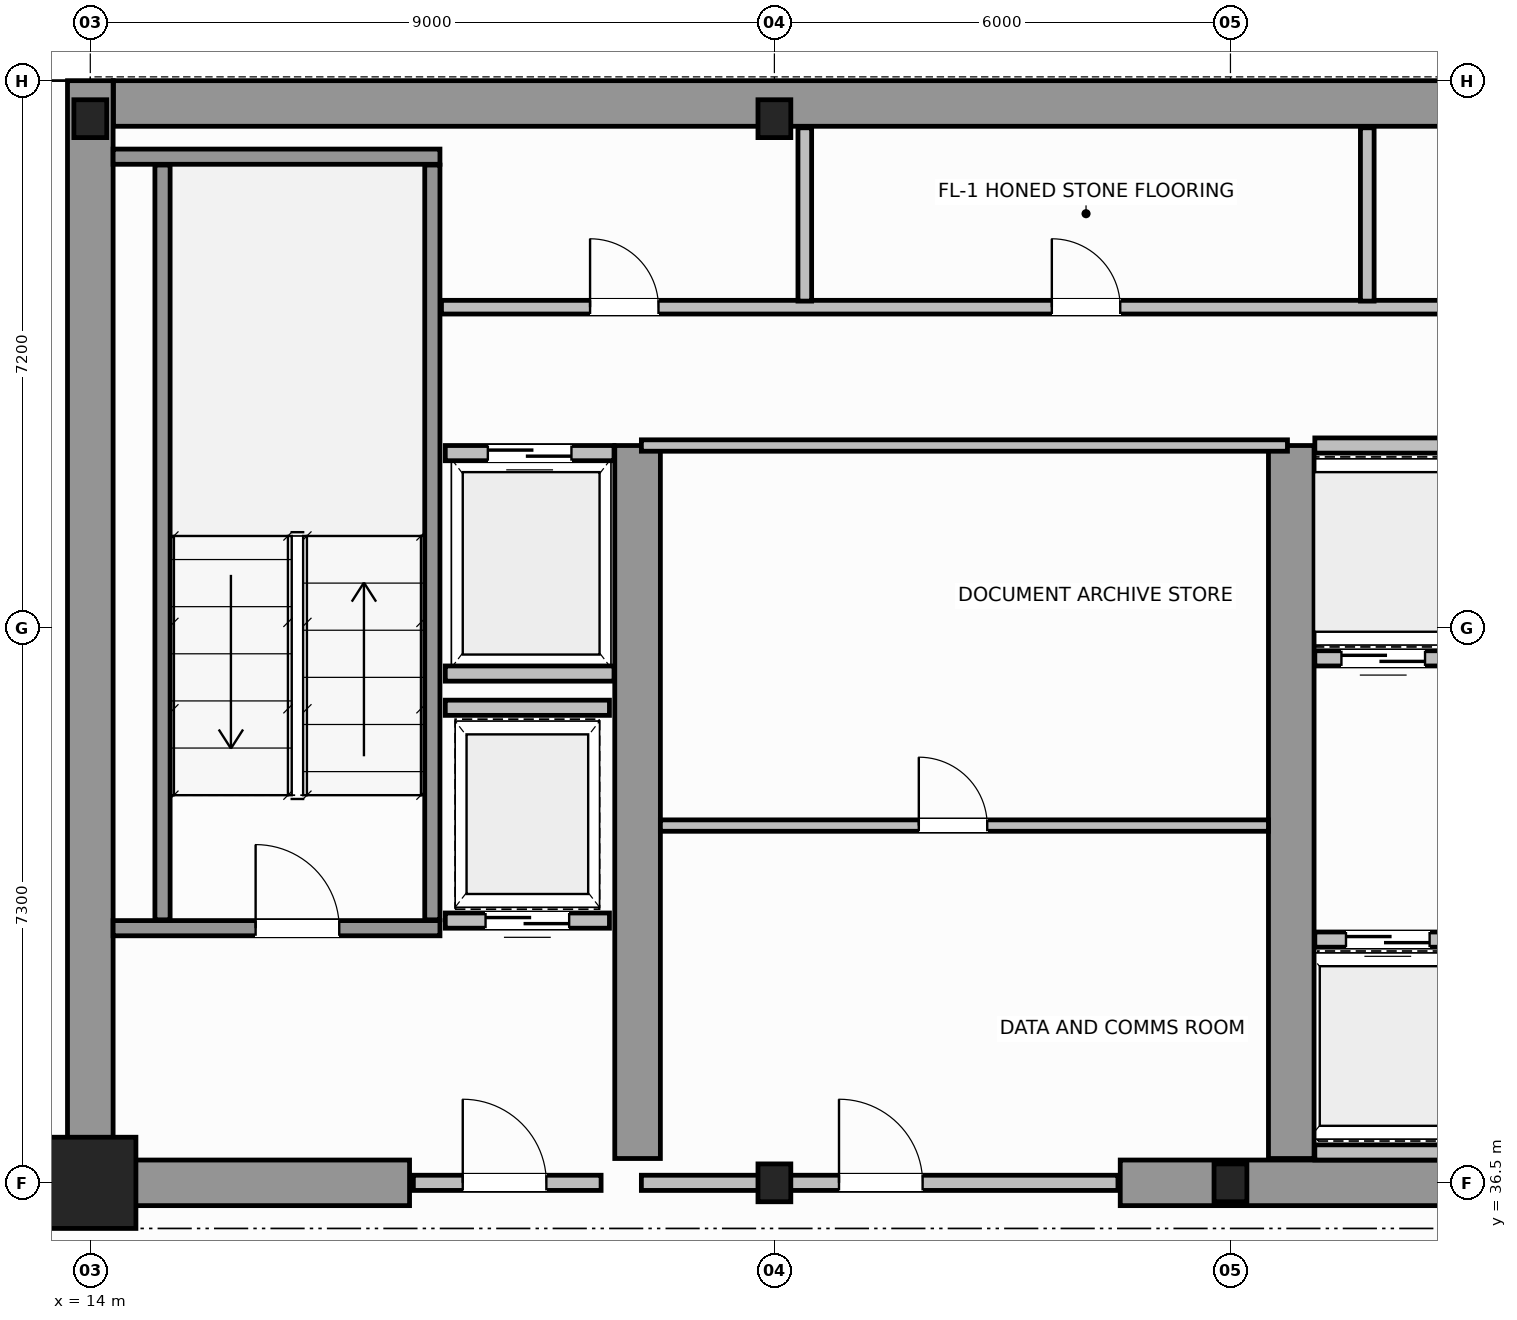
"""IFC4 building model, lengths in metres.
Left out: names, types, materials, properties, quantities, classifications, styles, units other than length and angle.
Written with IfcOpenShell. Run it as: python <this file> out.ifc"""

import sys

from ifc_helpers import new_model, si_unit, direction, frame, frame_2d, origin, origin_2d, place, context, subcontext, project, spatial, rectangle, i_section, extrude, source, transform, mapped, element, fill, save


model = new_model("IFC4")
c1 = context("Model", 3, precision=1e-05, world=origin(), true_north=direction((0.0, 1.0)))
c2 = subcontext(c1, "Body", "Model", "MODEL_VIEW")
j1 = project(units=[si_unit("LENGTHUNIT", "METRE"), si_unit("PLANEANGLEUNIT", "RADIAN")], contexts=[c1])
p1 = place(None, origin())
s1 = spatial("IfcSite", under=j1, at=p1, CompositionType="ELEMENT")
p2 = place(p1, origin())
s2 = spatial("IfcBuilding", under=s1, at=p2, CompositionType="ELEMENT")
p3 = place(p2, frame((0.0, 0.0, 176.6)))
s3 = spatial("IfcBuildingStorey", under=s2, at=p3, CompositionType="ELEMENT", Elevation=176.6)
m1 = source(origin(), c2, "Body", "SweptSolid", [
    extrude(rectangle(XDim=1.2, YDim=1.2, at=origin_2d()), origin(), (0.0, 0.0, 1.0), 3.8),
])
p4 = place(p3, frame((14.0, 36.5, 0.0), z_axis=(0.0, 0.0, 1.0), x_axis=(1.0, 0.0, 0.0)))
e1 = element("IfcColumn", 1, at=p4, inside=s3, PredefinedType="COLUMN", context=c2, shape_type="MappedRepresentation", body=[
    mapped(m1, transform((0.0, 0.0, 0.0), scale=1.0)),
])
m2 = source(origin(), c2, "Body", "SweptSolid", [
    extrude(i_section(OverallWidth=0.432, OverallDepth=0.498, WebThickness=0.055, FlangeThickness=0.068, FilletRadius=0.015, at=origin_2d()), origin(), (0.0, 0.0, 1.0), 3.8),
])
for number, where, z_axis, x_axis in (
    (2, (23.0, 36.5, 0.0), (0.0, 0.0, 1.0), (1.0, 0.0, 0.0)),
    (3, (29.0, 36.5, 0.0), (0.0, 0.0, 1.0), (1.0, 0.0, 0.0)),
    (4, (14.0, 50.5, 0.0), (0.0, 0.0, 1.0), (1.0, 0.0, 0.0)),
    (5, (23.0, 50.5, 0.0), (0.0, 0.0, 1.0), (1.0, 0.0, 0.0)),
):
    element("IfcColumn", number, at=place(p3, frame(where, z_axis=z_axis, x_axis=x_axis)), inside=s3, PredefinedType="COLUMN", context=c2, shape_type="MappedRepresentation", body=[
        mapped(m2, transform((0.0, 0.0, 0.0), scale=1.0)),
    ])
p5 = place(p3, frame((14.304, 50.7, 0.0), z_axis=(0.0, 0.0, 1.0), x_axis=(1.0, 0.0, 0.0)))
e6 = element("IfcWall", 6, at=p5, inside=s3, PredefinedType="SHEAR", context=c2, shape_type="SweptSolid", body=[
    extrude(rectangle(XDim=19.694, YDim=0.6, at=frame_2d((9.847, 0.0))), origin(), (0.0, 0.0, 1.0), 3.8),
])
p6 = place(p3, frame((14.0, 36.5, 0.0), z_axis=(0.0, 0.0, 1.0), x_axis=(0.0, 1.0, 0.0)))
e7 = element("IfcWall", 7, at=p6, inside=s3, PredefinedType="SHEAR", context=c2, shape_type="SweptSolid", body=[
    extrude(rectangle(XDim=14.5, YDim=0.6, at=frame_2d((7.25, 0.0))), origin(), (0.0, 0.0, 1.0), 3.8),
])
p7 = place(p3, frame((14.32, 36.5, 0.0), z_axis=(0.0, 0.0, 1.0), x_axis=(1.0, 0.0, 0.0)))
e8 = element("IfcWall", 8, at=p7, inside=s3, PredefinedType="SHEAR", context=c2, shape_type="SweptSolid", body=[
    extrude(rectangle(XDim=3.88, YDim=0.6, at=frame_2d((1.94, 0.0))), origin(), (0.0, 0.0, 1.0), 2.58),
])
p8 = place(p3, frame((27.55, 36.5, 0.0), z_axis=(0.0, 0.0, 1.0), x_axis=(1.0, 0.0, 0.0)))
e9 = element("IfcWall", 9, at=p8, inside=s3, PredefinedType="SHEAR", context=c2, shape_type="SweptSolid", body=[
    extrude(rectangle(XDim=4.5, YDim=0.6, at=frame_2d((2.25, 0.0))), origin(), (0.0, 0.0, 1.0), 3.8),
])
for number, where, z_axis, x_axis in (
    (10, (21.2, 36.82, 0.0), (0.0, 0.0, 1.0), (0.0, 1.0, 0.0)),
    (11, (29.8, 36.82, 0.0), (0.0, 0.0, 1.0), (0.0, 1.0, 0.0)),
):
    element("IfcWall", number, at=place(p3, frame(where, z_axis=z_axis, x_axis=x_axis)), inside=s3, PredefinedType="SHEAR", context=c2, shape_type="SweptSolid", body=[
        extrude(rectangle(XDim=9.38, YDim=0.6, at=frame_2d((4.69, 0.0))), origin(), (0.0, 0.0, 1.0), 3.8),
    ])
p9 = place(p3, frame((14.3, 39.85, 0.0), z_axis=(0.0, 0.0, 1.0), x_axis=(1.0, 0.0, 0.0)))
e12 = element("IfcWall", 12, at=p9, inside=s3, PredefinedType="SOLIDWALL", context=c2, shape_type="SweptSolid", body=[
    extrude(rectangle(XDim=4.3, YDim=0.2, at=frame_2d((2.15, 0.0))), origin(), (0.0, 0.0, 1.0), 3.8),
])
p10 = place(p9, frame((1.875, 0.0, 0.0)))
e13 = element("IfcOpeningElement", 13, at=p10, cuts=e12, PredefinedType="OPENING", context=c2, shape_type="SweptSolid", body=[
    extrude(rectangle(XDim=1.1, YDim=2.15, at=frame_2d((0.55, 1.075))), frame((0.0, 0.11, 0.0), z_axis=(0.0, -1.0, 0.0), x_axis=(1.0, 0.0, 0.0)), (0.0, 0.0, 1.0), 0.22),
])
p11 = place(p3, frame((14.3, 50.0, 0.0), z_axis=(0.0, 0.0, 1.0), x_axis=(1.0, 0.0, 0.0)))
e14 = element("IfcWall", 14, at=p11, inside=s3, PredefinedType="SOLIDWALL", context=c2, shape_type="SweptSolid", body=[
    extrude(rectangle(XDim=4.3, YDim=0.2, at=frame_2d((2.15, 0.0))), origin(), (0.0, 0.0, 1.0), 3.8),
])
for number, where, z_axis, x_axis in (
    (15, (14.95, 39.96, 0.0), (0.0, 0.0, 1.0), (0.0, 1.0, 0.0)),
    (16, (18.5, 39.96, 0.0), (0.0, 0.0, 1.0), (0.0, 1.0, 0.0)),
):
    element("IfcWall", number, at=place(p3, frame(where, z_axis=z_axis, x_axis=x_axis)), inside=s3, PredefinedType="SOLIDWALL", context=c2, shape_type="SweptSolid", body=[
        extrude(rectangle(XDim=9.93, YDim=0.2, at=frame_2d((4.965, 0.0))), origin(), (0.0, 0.0, 1.0), 3.8),
    ])
p12 = place(p3, frame((18.25, 36.5, 0.0), z_axis=(0.0, 0.0, 1.0), x_axis=(1.0, 0.0, 0.0)))
e17 = element("IfcWall", 17, at=p12, inside=s3, PredefinedType="SOLIDWALL", context=c2, shape_type="SweptSolid", body=[
    extrude(rectangle(XDim=2.47, YDim=0.2, at=frame_2d((1.235, 0.0))), origin(), (0.0, 0.0, 1.0), 2.57),
])
p13 = place(p12, frame((0.65, 0.0, 0.0)))
e18 = element("IfcOpeningElement", 18, at=p13, cuts=e17, PredefinedType="OPENING", context=c2, shape_type="SweptSolid", body=[
    extrude(rectangle(XDim=1.1, YDim=2.15, at=frame_2d((0.55, 1.075))), frame((0.0, 0.11, 0.0), z_axis=(0.0, -1.0, 0.0), x_axis=(1.0, 0.0, 0.0)), (0.0, 0.0, 1.0), 0.22),
])
p14 = place(p3, frame((30.11, 39.7, 0.0), z_axis=(0.0, 0.0, 1.0), x_axis=(1.0, 0.0, 0.0)))
e19 = element("IfcWall", 19, at=p14, inside=s3, PredefinedType="SOLIDWALL", context=c2, shape_type="SweptSolid", body=[
    extrude(rectangle(XDim=1.92, YDim=0.2, at=frame_2d((0.96, 0.0))), origin(), (0.0, 0.0, 1.0), 3.58),
])
p15 = place(p14, frame((0.41, 0.0, 0.0)))
e20 = element("IfcOpeningElement", 20, at=p15, cuts=e19, PredefinedType="OPENING", context=c2, shape_type="SweptSolid", body=[
    extrude(rectangle(XDim=1.1, YDim=2.15, at=frame_2d((0.55, 1.075))), frame((0.0, 0.11, 0.0), z_axis=(0.0, -1.0, 0.0), x_axis=(1.0, 0.0, 0.0)), (0.0, 0.0, 1.0), 0.22),
])
p16 = place(p3, frame((30.11, 36.9, 0.0), z_axis=(0.0, 0.0, 1.0), x_axis=(1.0, 0.0, 0.0)))
e21 = element("IfcWall", 21, at=p16, inside=s3, PredefinedType="SOLIDWALL", context=c2, shape_type="SweptSolid", body=[
    extrude(rectangle(XDim=1.92, YDim=0.2, at=frame_2d((0.96, 0.0))), origin(), (0.0, 0.0, 1.0), 2.37),
])
p17 = place(p3, frame((30.11, 43.4, 0.0), z_axis=(0.0, 0.0, 1.0), x_axis=(1.0, 0.0, 0.0)))
e22 = element("IfcWall", 22, at=p17, inside=s3, PredefinedType="SOLIDWALL", context=c2, shape_type="SweptSolid", body=[
    extrude(rectangle(XDim=1.8, YDim=0.2, at=frame_2d((0.9, 0.0))), origin(), (0.0, 0.0, 1.0), 3.58),
])
p18 = place(p17, frame((0.35, 0.0, 0.0)))
e23 = element("IfcOpeningElement", 23, at=p18, cuts=e22, PredefinedType="OPENING", context=c2, shape_type="SweptSolid", body=[
    extrude(rectangle(XDim=1.1, YDim=2.15, at=frame_2d((0.55, 1.075))), frame((0.0, 0.11, 0.0), z_axis=(0.0, -1.0, 0.0), x_axis=(1.0, 0.0, 0.0)), (0.0, 0.0, 1.0), 0.22),
])
p19 = place(p3, frame((30.11, 46.2, 0.0), z_axis=(0.0, 0.0, 1.0), x_axis=(1.0, 0.0, 0.0)))
e24 = element("IfcWall", 24, at=p19, inside=s3, PredefinedType="SOLIDWALL", context=c2, shape_type="SweptSolid", body=[
    extrude(rectangle(XDim=1.8, YDim=0.2, at=frame_2d((0.9, 0.0))), origin(), (0.0, 0.0, 1.0), 3.58),
])
p20 = place(p3, frame((18.67, 46.1, 0.0), z_axis=(0.0, 0.0, 1.0), x_axis=(1.0, 0.0, 0.0)))
e25 = element("IfcWall", 25, at=p20, inside=s3, PredefinedType="SOLIDWALL", context=c2, shape_type="SweptSolid", body=[
    extrude(rectangle(XDim=2.22, YDim=0.2, at=frame_2d((1.11, 0.0))), origin(), (0.0, 0.0, 1.0), 3.58),
])
p21 = place(p20, frame((0.56, 0.0, 0.0)))
e26 = element("IfcOpeningElement", 26, at=p21, cuts=e25, PredefinedType="OPENING", context=c2, shape_type="SweptSolid", body=[
    extrude(rectangle(XDim=1.1, YDim=2.15, at=frame_2d((0.55, 1.075))), frame((0.0, 0.11, 0.0), z_axis=(0.0, -1.0, 0.0), x_axis=(1.0, 0.0, 0.0)), (0.0, 0.0, 1.0), 0.22),
])
p22 = place(p3, frame((18.67, 43.2, 0.0), z_axis=(0.0, 0.0, 1.0), x_axis=(1.0, 0.0, 0.0)))
e27 = element("IfcWall", 27, at=p22, inside=s3, PredefinedType="SOLIDWALL", context=c2, shape_type="SweptSolid", body=[
    extrude(rectangle(XDim=2.22, YDim=0.2, at=frame_2d((1.11, 0.0))), origin(), (0.0, 0.0, 1.0), 3.58),
])
p23 = place(p3, frame((18.67, 39.95, 0.0), z_axis=(0.0, 0.0, 1.0), x_axis=(1.0, 0.0, 0.0)))
e28 = element("IfcWall", 28, at=p23, inside=s3, PredefinedType="SOLIDWALL", context=c2, shape_type="SweptSolid", body=[
    extrude(rectangle(XDim=2.16, YDim=0.2, at=frame_2d((1.08, 0.0))), origin(), (0.0, 0.0, 1.0), 3.58),
])
p24 = place(p23, frame((0.53, 0.0, 0.0)))
e29 = element("IfcOpeningElement", 29, at=p24, cuts=e28, PredefinedType="OPENING", context=c2, shape_type="SweptSolid", body=[
    extrude(rectangle(XDim=1.1, YDim=2.15, at=frame_2d((0.55, 1.075))), frame((0.0, 0.11, 0.0), z_axis=(0.0, -1.0, 0.0), x_axis=(1.0, 0.0, 0.0)), (0.0, 0.0, 1.0), 0.22),
])
p25 = place(p3, frame((18.67, 42.75, 0.0), z_axis=(0.0, 0.0, 1.0), x_axis=(1.0, 0.0, 0.0)))
e30 = element("IfcWall", 30, at=p25, inside=s3, PredefinedType="SOLIDWALL", context=c2, shape_type="SweptSolid", body=[
    extrude(rectangle(XDim=2.16, YDim=0.2, at=frame_2d((1.08, 0.0))), origin(), (0.0, 0.0, 1.0), 3.58),
])
p26 = place(p3, frame((21.25, 36.5, 0.0), z_axis=(0.0, 0.0, 1.0), x_axis=(1.0, 0.0, 0.0)))
e31 = element("IfcWall", 31, at=p26, inside=s3, PredefinedType="SOLIDWALL", context=c2, shape_type="SweptSolid", body=[
    extrude(rectangle(XDim=6.27, YDim=0.2, at=frame_2d((3.135, 0.0))), origin(), (0.0, 0.0, 1.0), 2.37),
])
p27 = place(p26, frame((2.6, 0.0, 0.0)))
e32 = element("IfcOpeningElement", 32, at=p27, cuts=e31, PredefinedType="OPENING", context=c2, shape_type="SweptSolid", body=[
    extrude(rectangle(XDim=1.1, YDim=2.15, at=frame_2d((0.55, 1.075))), frame((0.0, 0.11, 0.0), z_axis=(0.0, -1.0, 0.0), x_axis=(1.0, 0.0, 0.0)), (0.0, 0.0, 1.0), 0.22),
])
p28 = place(p3, frame((21.25, 46.2, 0.0), z_axis=(0.0, 0.0, 1.0), x_axis=(1.0, 0.0, 0.0)))
e33 = element("IfcWall", 33, at=p28, inside=s3, PredefinedType="PARTITIONING", context=c2, shape_type="SweptSolid", body=[
    extrude(rectangle(XDim=8.5, YDim=0.15, at=frame_2d((4.25, 0.0))), origin(), (0.0, 0.0, 1.0), 3.58),
])
p29 = place(p3, frame((21.5, 41.2, 0.0), z_axis=(0.0, 0.0, 1.0), x_axis=(1.0, 0.0, 0.0)))
e34 = element("IfcWall", 34, at=p29, inside=s3, PredefinedType="PARTITIONING", context=c2, shape_type="SweptSolid", body=[
    extrude(rectangle(XDim=8.0, YDim=0.15, at=frame_2d((4.0, 0.0))), origin(), (0.0, 0.0, 1.0), 3.58),
])
p30 = place(p29, frame((3.4, 0.0, 0.0)))
e35 = element("IfcOpeningElement", 35, at=p30, cuts=e34, PredefinedType="OPENING", context=c2, shape_type="SweptSolid", body=[
    extrude(rectangle(XDim=0.9, YDim=2.1, at=frame_2d((0.45, 1.05))), frame((0.0, 0.085, 0.0), z_axis=(0.0, -1.0, 0.0), x_axis=(1.0, 0.0, 0.0)), (0.0, 0.0, 1.0), 0.17),
])
p31 = place(p3, frame((18.62, 48.02, 0.0), z_axis=(0.0, 0.0, 1.0), x_axis=(1.0, 0.0, 0.0)))
e36 = element("IfcWall", 36, at=p31, inside=s3, PredefinedType="PLUMBINGWALL", context=c2, shape_type="SweptSolid", body=[
    extrude(rectangle(XDim=30.76, YDim=0.18, at=frame_2d((15.38, 0.0))), origin(), (0.0, 0.0, 1.0), 3.58),
])
p32 = place(p31, frame((1.955, 0.0, 0.0)))
e37 = element("IfcOpeningElement", 37, at=p32, cuts=e36, PredefinedType="OPENING", context=c2, shape_type="SweptSolid", body=[
    extrude(rectangle(XDim=0.9, YDim=2.15, at=frame_2d((0.45, 1.075))), frame((0.0, 0.1, 0.0), z_axis=(0.0, -1.0, 0.0), x_axis=(1.0, 0.0, 0.0)), (0.0, 0.0, 1.0), 0.2),
])
p33 = place(p31, frame((8.03, 0.0, 0.0)))
e38 = element("IfcOpeningElement", 38, at=p33, cuts=e36, PredefinedType="OPENING", context=c2, shape_type="SweptSolid", body=[
    extrude(rectangle(XDim=0.9, YDim=2.15, at=frame_2d((0.45, 1.075))), frame((0.0, 0.1, 0.0), z_axis=(0.0, -1.0, 0.0), x_axis=(1.0, 0.0, 0.0)), (0.0, 0.0, 1.0), 0.2),
])
p34 = place(p31, frame((16.93, 0.0, 0.0)))
e39 = element("IfcOpeningElement", 39, at=p34, cuts=e36, PredefinedType="OPENING", context=c2, shape_type="SweptSolid", body=[
    extrude(rectangle(XDim=0.9, YDim=2.15, at=frame_2d((0.45, 1.075))), frame((0.0, 0.1, 0.0), z_axis=(0.0, -1.0, 0.0), x_axis=(1.0, 0.0, 0.0)), (0.0, 0.0, 1.0), 0.2),
])
p35 = place(p31, frame((26.205, 0.0, 0.0)))
e40 = element("IfcOpeningElement", 40, at=p35, cuts=e36, PredefinedType="OPENING", context=c2, shape_type="SweptSolid", body=[
    extrude(rectangle(XDim=0.9, YDim=2.15, at=frame_2d((0.45, 1.075))), frame((0.0, 0.1, 0.0), z_axis=(0.0, -1.0, 0.0), x_axis=(1.0, 0.0, 0.0)), (0.0, 0.0, 1.0), 0.2),
])
p36 = place(p3, frame((23.4, 48.1, 0.0), z_axis=(0.0, 0.0, 1.0), x_axis=(0.0, 1.0, 0.0)))
e41 = element("IfcWall", 41, at=p36, inside=s3, PredefinedType="PLUMBINGWALL", context=c2, shape_type="SweptSolid", body=[
    extrude(rectangle(XDim=2.28, YDim=0.18, at=frame_2d((1.14, 0.0))), origin(), (0.0, 0.0, 1.0), 2.37),
])
p37 = place(p3, frame((30.8, 48.1, 0.0), z_axis=(0.0, 0.0, 1.0), x_axis=(0.0, 1.0, 0.0)))
e42 = element("IfcWall", 42, at=p37, inside=s3, PredefinedType="PLUMBINGWALL", context=c2, shape_type="SweptSolid", body=[
    extrude(rectangle(XDim=2.28, YDim=0.18, at=frame_2d((1.14, 0.0))), origin(), (0.0, 0.0, 1.0), 3.58),
])
p38 = place(p3, frame((7.274, 36.48, 0.0), z_axis=(0.0, 0.0, 1.0), x_axis=(1.0, 0.0, 0.0)))
e43 = element("IfcWall", 43, at=p38, inside=s3, PredefinedType="PARTITIONING", context=c2, shape_type="SweptSolid", body=[
    extrude(rectangle(XDim=6.666, YDim=0.12, at=frame_2d((3.333, 0.0))), origin(), (0.0, 0.0, 1.0), 2.37),
])
p39 = place(p38, frame((2.883, 0.0, 0.0)))
e44 = element("IfcOpeningElement", 44, at=p39, cuts=e43, PredefinedType="OPENING", context=c2, shape_type="SweptSolid", body=[
    extrude(rectangle(XDim=0.9, YDim=2.15, at=frame_2d((0.45, 1.075))), frame((0.0, 0.07, 0.0), z_axis=(0.0, -1.0, 0.0), x_axis=(1.0, 0.0, 0.0)), (0.0, 0.0, 1.0), 0.14),
])
m3 = source(origin(), c2, "Body", "SweptSolid", [
    extrude(rectangle(XDim=1.1, YDim=2.15, at=frame_2d((0.55, 1.075))), frame((0.0, 0.025, 0.0), z_axis=(0.0, -1.0, 0.0), x_axis=(1.0, 0.0, 0.0)), (0.0, 0.0, 1.0), 0.05),
])
p40 = place(p10, origin())
e45 = element("IfcDoor", 45, at=p40, inside=s3, OperationType="SINGLE_SWING_LEFT", PredefinedType="DOOR", context=c2, shape_type="MappedRepresentation", body=[
    mapped(m3, transform((0.0, 0.0, 0.0), scale=1.0)),
])
fill(e13, e45)
p41 = place(p13, origin())
e46 = element("IfcDoor", 46, at=p41, inside=s3, OperationType="SINGLE_SWING_RIGHT", PredefinedType="DOOR", context=c2, shape_type="MappedRepresentation", body=[
    mapped(m3, transform((0.0, 0.0, 0.0), scale=1.0)),
])
fill(e18, e46)
p42 = place(p15, origin())
e47 = element("IfcDoor", 47, at=p42, inside=s3, OperationType="DOUBLE_DOOR_SLIDING", PredefinedType="DOOR", context=c2, shape_type="MappedRepresentation", body=[
    mapped(m3, transform((0.0, 0.0, 0.0), scale=1.0)),
])
fill(e20, e47)
p43 = place(p18, origin())
e48 = element("IfcDoor", 48, at=p43, inside=s3, OperationType="DOUBLE_DOOR_SLIDING", PredefinedType="DOOR", context=c2, shape_type="MappedRepresentation", body=[
    mapped(m3, transform((0.0, 0.0, 0.0), scale=1.0)),
])
fill(e23, e48)
p44 = place(p21, origin())
e49 = element("IfcDoor", 49, at=p44, inside=s3, OperationType="DOUBLE_DOOR_SLIDING", PredefinedType="DOOR", context=c2, shape_type="MappedRepresentation", body=[
    mapped(m3, transform((0.0, 0.0, 0.0), scale=1.0)),
])
fill(e26, e49)
p45 = place(p24, origin())
e50 = element("IfcDoor", 50, at=p45, inside=s3, OperationType="DOUBLE_DOOR_SLIDING", PredefinedType="DOOR", context=c2, shape_type="MappedRepresentation", body=[
    mapped(m3, transform((0.0, 0.0, 0.0), scale=1.0)),
])
fill(e29, e50)
p46 = place(p27, origin())
e51 = element("IfcDoor", 51, at=p46, inside=s3, OperationType="SINGLE_SWING_LEFT", PredefinedType="DOOR", context=c2, shape_type="MappedRepresentation", body=[
    mapped(m3, transform((0.0, 0.0, 0.0), scale=1.0)),
])
fill(e32, e51)
m4 = source(origin(), c2, "Body", "SweptSolid", [
    extrude(rectangle(XDim=0.9, YDim=2.1, at=frame_2d((0.45, 1.05))), frame((0.0, 0.025, 0.0), z_axis=(0.0, -1.0, 0.0), x_axis=(1.0, 0.0, 0.0)), (0.0, 0.0, 1.0), 0.05),
])
p47 = place(p30, origin())
e52 = element("IfcDoor", 52, at=p47, inside=s3, OperationType="SINGLE_SWING_RIGHT", PredefinedType="DOOR", context=c2, shape_type="MappedRepresentation", body=[
    mapped(m4, transform((0.0, 0.0, 0.0), scale=1.0)),
])
fill(e35, e52)
m5 = source(origin(), c2, "Body", "SweptSolid", [
    extrude(rectangle(XDim=0.9, YDim=2.15, at=frame_2d((0.45, 1.075))), frame((0.0, 0.025, 0.0), z_axis=(0.0, -1.0, 0.0), x_axis=(1.0, 0.0, 0.0)), (0.0, 0.0, 1.0), 0.05),
])
p48 = place(p32, origin())
e53 = element("IfcDoor", 53, at=p48, inside=s3, OperationType="SINGLE_SWING_LEFT", PredefinedType="DOOR", context=c2, shape_type="MappedRepresentation", body=[
    mapped(m5, transform((0.0, 0.0, 0.0), scale=1.0)),
])
fill(e37, e53)
p49 = place(p33, origin())
e54 = element("IfcDoor", 54, at=p49, inside=s3, OperationType="SINGLE_SWING_RIGHT", PredefinedType="DOOR", context=c2, shape_type="MappedRepresentation", body=[
    mapped(m5, transform((0.0, 0.0, 0.0), scale=1.0)),
])
fill(e38, e54)
save(model, sys.argv[1])
